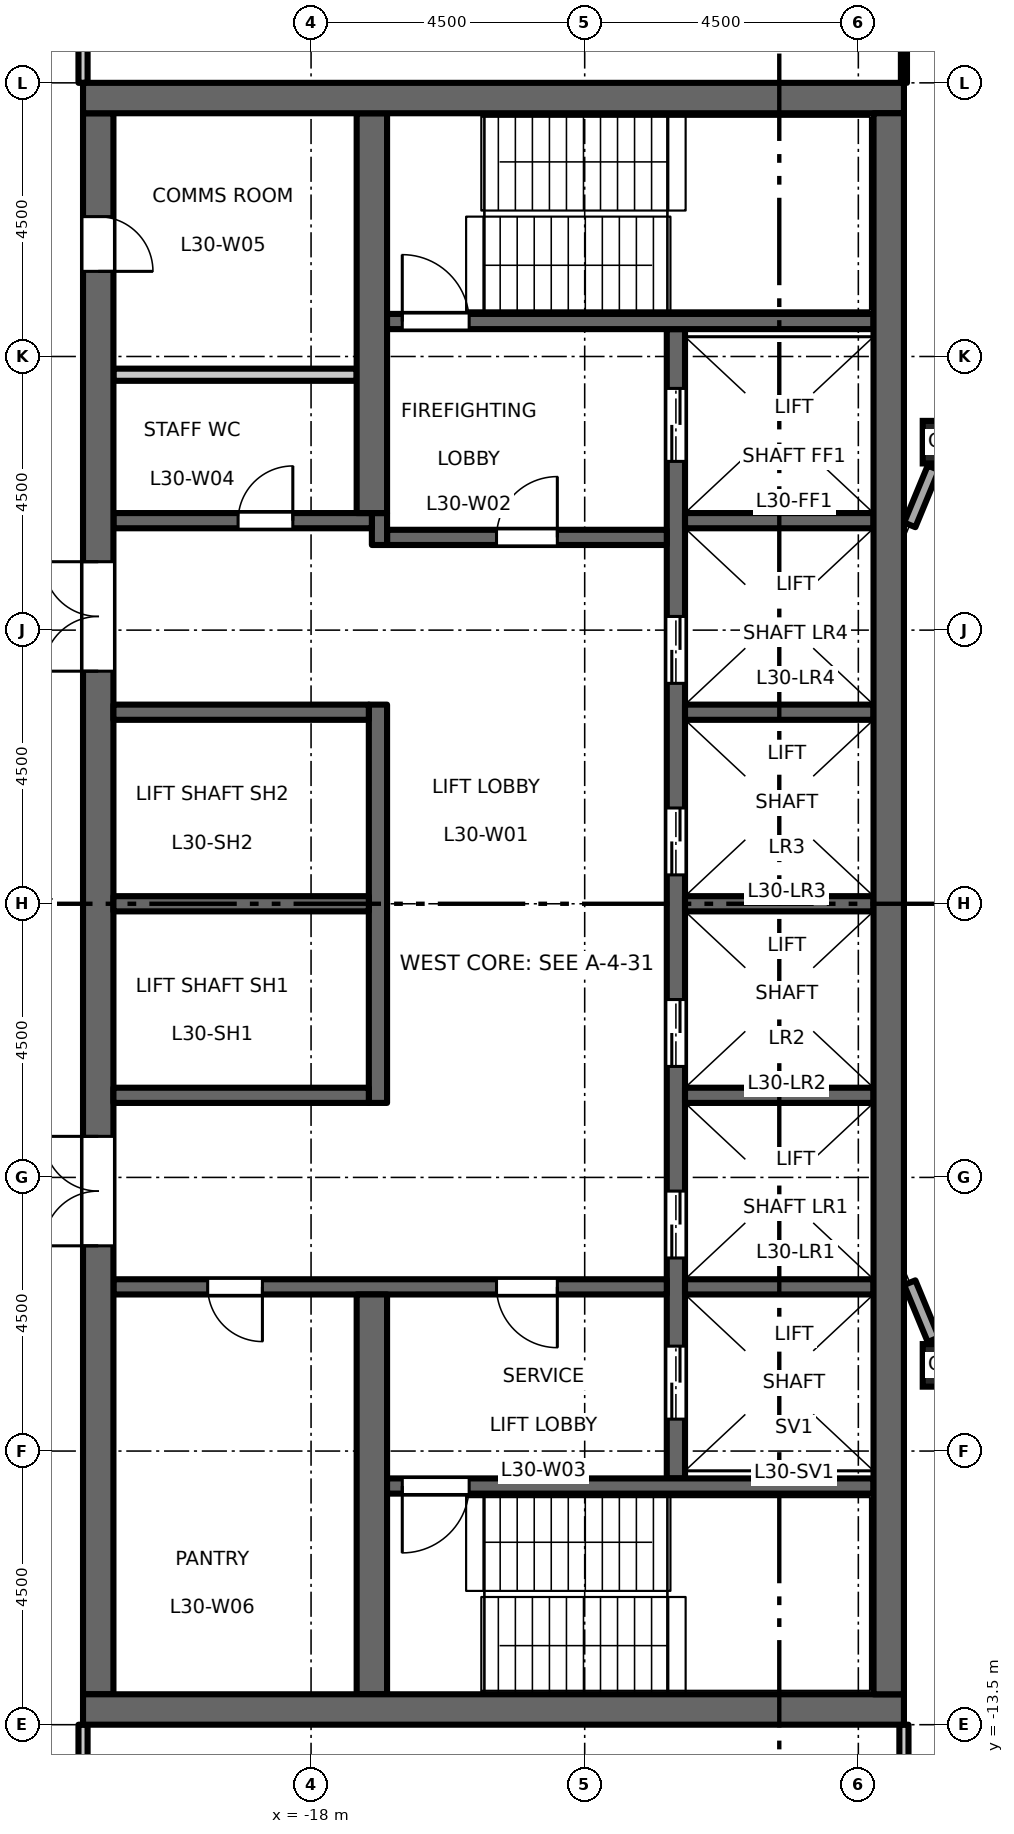
"""IFC4 building model, lengths in metres.
Left out: names, types, materials, properties, quantities, classifications, styles, units other than length and angle.
Written with IfcOpenShell. Run it as: python <this file> out.ifc"""

import sys

from ifc_helpers import new_model, si_unit, direction, frame, frame_2d, origin, origin_2d, place, context, subcontext, project, spatial, rectangle, hollow_rectangle, extrude, element, fill, save


model = new_model("IFC4")
c1 = context("Model", 3, precision=1e-05, world=origin(), true_north=direction((0.0, 1.0)))
c2 = subcontext(c1, "Body", "Model", "MODEL_VIEW")
j1 = project(units=[si_unit("LENGTHUNIT", "METRE"), si_unit("PLANEANGLEUNIT", "RADIAN")], contexts=[c1])
p1 = place(None, origin())
s1 = spatial("IfcSite", under=j1, at=p1, CompositionType="ELEMENT")
p2 = place(p1, origin())
s2 = spatial("IfcBuilding", under=s1, at=p2, CompositionType="ELEMENT")
p3 = place(p2, frame((0.0, 0.0, 140.7)))
s3 = spatial("IfcBuildingStorey", under=s2, at=p3, CompositionType="ELEMENT", Elevation=140.7)
for number, where, z_axis, x_axis in (
    (1, (-7.591, -7.591, 0.0), (0.0, 0.0, 1.0), (1.0, 0.0, 0.0)),
    (2, (-7.591, 7.591, 0.0), (0.0, 0.0, 1.0), (1.0, 0.0, 0.0)),
):
    element("IfcColumn", number, at=place(p3, frame(where, z_axis=z_axis, x_axis=x_axis)), inside=s3, PredefinedType="COLUMN", context=c2, shape_type="SweptSolid", body=[
        extrude(hollow_rectangle(XDim=0.7, YDim=0.7, WallThickness=0.04, at=origin_2d()), origin(), (0.0, 0.0, 1.0), 4.5),
    ])
p4 = place(p3, frame((-12.0, -9.45, 0.0), z_axis=(0.0, 0.0, 1.0), x_axis=(0.0, 1.0, 0.0)))
e3 = element("IfcWall", 3, at=p4, inside=s3, PredefinedType="SHEAR", context=c2, shape_type="SweptSolid", body=[
    extrude(rectangle(XDim=18.9, YDim=0.3, at=frame_2d((9.45, 0.0))), origin(), (0.0, 0.0, 1.0), 4.35),
])
p5 = place(p4, frame((3.625, 0.0, 0.0)))
e4 = element("IfcOpeningElement", 4, at=p5, cuts=e3, PredefinedType="OPENING", context=c2, shape_type="SweptSolid", body=[
    extrude(rectangle(XDim=1.1, YDim=2.1, at=frame_2d((0.55, 1.05))), frame((0.0, 0.16, 0.0), z_axis=(0.0, -1.0, 0.0), x_axis=(1.0, 0.0, 0.0)), (0.0, 0.0, 1.0), 0.32),
])
p6 = place(p4, frame((6.775, 0.0, 0.0)))
e5 = element("IfcOpeningElement", 5, at=p6, cuts=e3, PredefinedType="OPENING", context=c2, shape_type="SweptSolid", body=[
    extrude(rectangle(XDim=1.1, YDim=2.1, at=frame_2d((0.55, 1.05))), frame((0.0, 0.16, 0.0), z_axis=(0.0, -1.0, 0.0), x_axis=(1.0, 0.0, 0.0)), (0.0, 0.0, 1.0), 0.32),
])
p7 = place(p4, frame((9.925, 0.0, 0.0)))
e6 = element("IfcOpeningElement", 6, at=p7, cuts=e3, PredefinedType="OPENING", context=c2, shape_type="SweptSolid", body=[
    extrude(rectangle(XDim=1.1, YDim=2.1, at=frame_2d((0.55, 1.05))), frame((0.0, 0.16, 0.0), z_axis=(0.0, -1.0, 0.0), x_axis=(1.0, 0.0, 0.0)), (0.0, 0.0, 1.0), 0.32),
])
p8 = place(p4, frame((13.075, 0.0, 0.0)))
e7 = element("IfcOpeningElement", 7, at=p8, cuts=e3, PredefinedType="OPENING", context=c2, shape_type="SweptSolid", body=[
    extrude(rectangle(XDim=1.1, YDim=2.1, at=frame_2d((0.55, 1.05))), frame((0.0, 0.16, 0.0), z_axis=(0.0, -1.0, 0.0), x_axis=(1.0, 0.0, 0.0)), (0.0, 0.0, 1.0), 0.32),
])
p9 = place(p4, frame((16.725, 0.0, 0.0)))
e8 = element("IfcOpeningElement", 8, at=p9, cuts=e3, PredefinedType="OPENING", context=c2, shape_type="SweptSolid", body=[
    extrude(rectangle(XDim=1.2, YDim=2.1, at=frame_2d((0.6, 1.05))), frame((0.0, 0.16, 0.0), z_axis=(0.0, -1.0, 0.0), x_axis=(1.0, 0.0, 0.0)), (0.0, 0.0, 1.0), 0.32),
])
p10 = place(p4, frame((0.975, 0.0, 0.0)))
e9 = element("IfcOpeningElement", 9, at=p10, cuts=e3, PredefinedType="OPENING", context=c2, shape_type="SweptSolid", body=[
    extrude(rectangle(XDim=1.2, YDim=2.1, at=frame_2d((0.6, 1.05))), frame((0.0, 0.16, 0.0), z_axis=(0.0, -1.0, 0.0), x_axis=(1.0, 0.0, 0.0)), (0.0, 0.0, 1.0), 0.32),
])
p11 = place(p3, frame((-12.15, 6.025, 0.0), z_axis=(0.0, 0.0, 1.0), x_axis=(-1.0, 0.0, 0.0)))
e10 = element("IfcWall", 10, at=p11, inside=s3, PredefinedType="SHEAR", context=c2, shape_type="SweptSolid", body=[
    extrude(rectangle(XDim=4.6, YDim=0.25, at=frame_2d((2.3, 0.0))), origin(), (0.0, 0.0, 1.0), 4.35),
])
p12 = place(p11, frame((1.8, 0.0, 0.0)))
e11 = element("IfcOpeningElement", 11, at=p12, cuts=e10, PredefinedType="OPENING", context=c2, shape_type="SweptSolid", body=[
    extrude(rectangle(XDim=1.0, YDim=2.1, at=frame_2d((0.5, 1.05))), frame((0.0, 0.135, 0.0), z_axis=(0.0, -1.0, 0.0), x_axis=(1.0, 0.0, 0.0)), (0.0, 0.0, 1.0), 0.27),
])
p13 = place(p3, frame((-16.875, 5.9, 0.0), z_axis=(0.0, 0.0, 1.0), x_axis=(0.0, 1.0, 0.0)))
e12 = element("IfcWall", 12, at=p13, inside=s3, PredefinedType="SHEAR", context=c2, shape_type="SweptSolid", body=[
    extrude(rectangle(XDim=0.525, YDim=0.25, at=frame_2d((0.263, 0.0))), origin(), (0.0, 0.0, 1.0), 4.35),
])
p14 = place(p3, frame((-17.0, 6.3, 0.0), z_axis=(0.0, 0.0, 1.0), x_axis=(-1.0, 0.0, 0.0)))
e13 = element("IfcWall", 13, at=p14, inside=s3, PredefinedType="SHEAR", context=c2, shape_type="SweptSolid", body=[
    extrude(rectangle(XDim=4.25, YDim=0.25, at=frame_2d((2.125, 0.0))), origin(), (0.0, 0.0, 1.0), 4.35),
])
p15 = place(p14, frame((1.3, 0.0, 0.0)))
e14 = element("IfcOpeningElement", 14, at=p15, cuts=e13, PredefinedType="OPENING", context=c2, shape_type="SweptSolid", body=[
    extrude(rectangle(XDim=0.9, YDim=2.1, at=frame_2d((0.45, 1.05))), frame((0.0, 0.135, 0.0), z_axis=(0.0, -1.0, 0.0), x_axis=(1.0, 0.0, 0.0)), (0.0, 0.0, 1.0), 0.27),
])
p16 = place(p3, frame((-12.15, -6.3, 0.0), z_axis=(0.0, 0.0, 1.0), x_axis=(-1.0, 0.0, 0.0)))
e15 = element("IfcWall", 15, at=p16, inside=s3, PredefinedType="SHEAR", context=c2, shape_type="SweptSolid", body=[
    extrude(rectangle(XDim=9.1, YDim=0.25, at=frame_2d((4.55, 0.0))), origin(), (0.0, 0.0, 1.0), 4.35),
])
p17 = place(p16, frame((1.8, 0.0, 0.0)))
e16 = element("IfcOpeningElement", 16, at=p17, cuts=e15, PredefinedType="OPENING", context=c2, shape_type="SweptSolid", body=[
    extrude(rectangle(XDim=1.0, YDim=2.1, at=frame_2d((0.5, 1.05))), frame((0.0, 0.135, 0.0), z_axis=(0.0, -1.0, 0.0), x_axis=(1.0, 0.0, 0.0)), (0.0, 0.0, 1.0), 0.27),
])
p18 = place(p16, frame((6.65, 0.0, 0.0)))
e17 = element("IfcOpeningElement", 17, at=p18, cuts=e15, PredefinedType="OPENING", context=c2, shape_type="SweptSolid", body=[
    extrude(rectangle(XDim=0.9, YDim=2.1, at=frame_2d((0.45, 1.05))), frame((0.0, 0.135, 0.0), z_axis=(0.0, -1.0, 0.0), x_axis=(1.0, 0.0, 0.0)), (0.0, 0.0, 1.0), 0.27),
])
p19 = place(p3, frame((-21.5, -13.0, 0.0), z_axis=(0.0, 0.0, 1.0), x_axis=(0.0, 1.0, 0.0)))
e18 = element("IfcWall", 18, at=p19, inside=s3, PredefinedType="SHEAR", context=c2, shape_type="SweptSolid", body=[
    extrude(rectangle(XDim=26.0, YDim=0.5, at=frame_2d((13.0, 0.0))), origin(), (0.0, 0.0, 1.0), 4.35),
])
p20 = place(p19, frame((16.825, 0.0, 0.0)))
e19 = element("IfcOpeningElement", 19, at=p20, cuts=e18, PredefinedType="OPENING", context=c2, shape_type="SweptSolid", body=[
    extrude(rectangle(XDim=1.8, YDim=2.1, at=frame_2d((0.9, 1.05))), frame((0.0, 0.26, 0.0), z_axis=(0.0, -1.0, 0.0), x_axis=(1.0, 0.0, 0.0)), (0.0, 0.0, 1.0), 0.52),
])
p21 = place(p19, frame((7.375, 0.0, 0.0)))
e20 = element("IfcOpeningElement", 20, at=p21, cuts=e18, PredefinedType="OPENING", context=c2, shape_type="SweptSolid", body=[
    extrude(rectangle(XDim=1.8, YDim=2.1, at=frame_2d((0.9, 1.05))), frame((0.0, 0.26, 0.0), z_axis=(0.0, -1.0, 0.0), x_axis=(1.0, 0.0, 0.0)), (0.0, 0.0, 1.0), 0.52),
])
p22 = place(p19, frame((23.4, 0.0, 0.0)))
e21 = element("IfcOpeningElement", 21, at=p22, cuts=e18, PredefinedType="OPENING", context=c2, shape_type="SweptSolid", body=[
    extrude(rectangle(XDim=0.9, YDim=2.1, at=frame_2d((0.45, 1.05))), frame((0.0, 0.26, 0.0), z_axis=(0.0, -1.0, 0.0), x_axis=(1.0, 0.0, 0.0)), (0.0, 0.0, 1.0), 0.52),
])
p23 = place(p3, frame((-17.25, 8.7, 0.0), z_axis=(0.0, 0.0, 1.0), x_axis=(-1.0, 0.0, 0.0)))
e22 = element("IfcWall", 22, at=p23, inside=s3, PredefinedType="PARTITIONING", context=c2, shape_type="SweptSolid", body=[
    extrude(rectangle(XDim=4.0, YDim=0.2, at=frame_2d((2.0, 0.0))), origin(), (0.0, 0.0, 1.0), 4.35),
])
p24 = place(p3, frame((-16.9, -3.275, 0.0), z_axis=(0.0, 0.0, 1.0), x_axis=(0.0, 1.0, 0.0)))
e23 = element("IfcWall", 23, at=p24, inside=s3, PredefinedType="SHEAR", context=c2, shape_type="SweptSolid", body=[
    extrude(rectangle(XDim=6.55, YDim=0.3, at=frame_2d((3.275, 0.0))), origin(), (0.0, 0.0, 1.0), 4.35),
])
for number, where, z_axis, x_axis in (
    (24, (-17.05, 0.0, 0.0), (0.0, 0.0, 1.0), (-1.0, 0.0, 0.0)),
    (25, (-17.05, 3.15, 0.0), (0.0, 0.0, 1.0), (-1.0, 0.0, 0.0)),
    (26, (-17.05, -3.15, 0.0), (0.0, 0.0, 1.0), (-1.0, 0.0, 0.0)),
):
    element("IfcWall", number, at=place(p3, frame(where, z_axis=z_axis, x_axis=x_axis)), inside=s3, PredefinedType="SHEAR", context=c2, shape_type="SweptSolid", body=[
        extrude(rectangle(XDim=4.2, YDim=0.25, at=frame_2d((2.1, 0.0))), origin(), (0.0, 0.0, 1.0), 4.35),
    ])
for number, where, z_axis, x_axis in (
    (27, (-17.0, 6.425, 0.0), (0.0, 0.0, 1.0), (0.0, 1.0, 0.0)),
    (28, (-17.0, -13.0, 0.0), (0.0, 0.0, 1.0), (0.0, 1.0, 0.0)),
):
    element("IfcWall", number, at=place(p3, frame(where, z_axis=z_axis, x_axis=x_axis)), inside=s3, PredefinedType="SHEAR", context=c2, shape_type="SweptSolid", body=[
        extrude(rectangle(XDim=6.575, YDim=0.5, at=frame_2d((3.288, 0.0))), origin(), (0.0, 0.0, 1.0), 4.35),
    ])
for number, where, z_axis, x_axis in (
    (29, (-8.75, 0.0, 0.0), (0.0, 0.0, 1.0), (-1.0, 0.0, 0.0)),
    (30, (-8.75, 3.15, 0.0), (0.0, 0.0, 1.0), (-1.0, 0.0, 0.0)),
    (31, (-8.75, 6.3, 0.0), (0.0, 0.0, 1.0), (-1.0, 0.0, 0.0)),
    (32, (-8.75, -3.15, 0.0), (0.0, 0.0, 1.0), (-1.0, 0.0, 0.0)),
    (33, (-8.75, -6.3, 0.0), (0.0, 0.0, 1.0), (-1.0, 0.0, 0.0)),
):
    element("IfcWall", number, at=place(p3, frame(where, z_axis=z_axis, x_axis=x_axis)), inside=s3, PredefinedType="SHEAR", context=c2, shape_type="SweptSolid", body=[
        extrude(rectangle(XDim=3.1, YDim=0.25, at=frame_2d((1.55, 0.0))), origin(), (0.0, 0.0, 1.0), 4.35),
    ])
p25 = place(p3, frame((-8.75, 9.575, 0.0), z_axis=(0.0, 0.0, 1.0), x_axis=(-1.0, 0.0, 0.0)))
e34 = element("IfcWall", 34, at=p25, inside=s3, PredefinedType="SHEAR", context=c2, shape_type="SweptSolid", body=[
    extrude(rectangle(XDim=8.0, YDim=0.25, at=frame_2d((4.0, 0.0))), origin(), (0.0, 0.0, 1.0), 4.35),
])
p26 = place(p25, frame((6.65, 0.0, 0.0)))
e35 = element("IfcOpeningElement", 35, at=p26, cuts=e34, PredefinedType="OPENING", context=c2, shape_type="SweptSolid", body=[
    extrude(rectangle(XDim=1.1, YDim=2.1, at=frame_2d((0.55, 1.05))), frame((0.0, 0.135, 0.0), z_axis=(0.0, -1.0, 0.0), x_axis=(1.0, 0.0, 0.0)), (0.0, 0.0, 1.0), 0.27),
])
p27 = place(p3, frame((-8.75, -9.575, 0.0), z_axis=(0.0, 0.0, 1.0), x_axis=(-1.0, 0.0, 0.0)))
e36 = element("IfcWall", 36, at=p27, inside=s3, PredefinedType="SHEAR", context=c2, shape_type="SweptSolid", body=[
    extrude(rectangle(XDim=8.0, YDim=0.25, at=frame_2d((4.0, 0.0))), origin(), (0.0, 0.0, 1.0), 4.35),
])
p28 = place(p27, frame((6.65, 0.0, 0.0)))
e37 = element("IfcOpeningElement", 37, at=p28, cuts=e36, PredefinedType="OPENING", context=c2, shape_type="SweptSolid", body=[
    extrude(rectangle(XDim=1.1, YDim=2.1, at=frame_2d((0.55, 1.05))), frame((0.0, 0.135, 0.0), z_axis=(0.0, -1.0, 0.0), x_axis=(1.0, 0.0, 0.0)), (0.0, 0.0, 1.0), 0.27),
])
for number, where, z_axis, x_axis in (
    (38, (-8.25, 13.25, 0.0), (0.0, 0.0, 1.0), (-1.0, 0.0, 0.0)),
    (39, (-8.25, -13.25, 0.0), (0.0, 0.0, 1.0), (-1.0, 0.0, 0.0)),
):
    element("IfcWall", number, at=place(p3, frame(where, z_axis=z_axis, x_axis=x_axis)), inside=s3, PredefinedType="SHEAR", context=c2, shape_type="SweptSolid", body=[
        extrude(rectangle(XDim=13.5, YDim=0.5, at=frame_2d((6.75, 0.0))), origin(), (0.0, 0.0, 1.0), 4.35),
    ])
p29 = place(p3, frame((-8.5, -13.0, 0.0), z_axis=(0.0, 0.0, 1.0), x_axis=(0.0, 1.0, 0.0)))
e40 = element("IfcWall", 40, at=p29, inside=s3, PredefinedType="SHEAR", context=c2, shape_type="SweptSolid", body=[
    extrude(rectangle(XDim=26.0, YDim=0.5, at=frame_2d((13.0, 0.0))), origin(), (0.0, 0.0, 1.0), 4.35),
])
for number, where, z_axis, x_axis in (
    (41, (-7.766, 7.168, 0.0), (0.0, 0.0, 1.0), (-0.383, -0.924, 0.0)),
    (42, (-8.154, -6.231, 0.0), (0.0, 0.0, 1.0), (0.383, -0.924, 0.0)),
):
    element("IfcWall", number, at=place(p3, frame(where, z_axis=z_axis, x_axis=x_axis)), inside=s3, PredefinedType="STANDARD", context=c2, shape_type="SweptSolid", body=[
        extrude(rectangle(XDim=1.015, YDim=0.2, at=frame_2d((0.507, 0.0))), origin(), (0.0, 0.0, 1.0), 3.826),
    ])
for number, where, z_axis, x_axis in (
    (43, (-21.75, -18.925, 0.0), (0.0, 0.0, 1.0), (0.0, 1.0, 0.0)),
    (44, (-21.75, 13.5, 0.0), (0.0, 0.0, 1.0), (0.0, 1.0, 0.0)),
):
    element("IfcWall", number, at=place(p3, frame(where, z_axis=z_axis, x_axis=x_axis)), inside=s3, PredefinedType="PARTITIONING", context=c2, shape_type="SweptSolid", body=[
        extrude(rectangle(XDim=5.425, YDim=0.15, at=frame_2d((2.712, 0.0))), origin(), (0.0, 0.0, 1.0), 4.35),
    ])
p30 = place(p3, frame((-8.25, 13.5, 0.0), z_axis=(0.0, 0.0, 1.0), x_axis=(0.0, 1.0, 0.0)))
e45 = element("IfcWall", 45, at=p30, inside=s3, PredefinedType="PARTITIONING", context=c2, shape_type="SweptSolid", body=[
    extrude(rectangle(XDim=5.425, YDim=0.1, at=frame_2d((2.712, 0.0))), origin(), (0.0, 0.0, 1.0), 4.35),
])
p31 = place(p3, frame((-8.25, -18.925, 0.0), z_axis=(0.0, 0.0, 1.0), x_axis=(0.0, 1.0, 0.0)))
e46 = element("IfcWall", 46, at=p31, inside=s3, PredefinedType="PARTITIONING", context=c2, shape_type="SweptSolid", body=[
    extrude(rectangle(XDim=5.425, YDim=0.15, at=frame_2d((2.712, 0.0))), origin(), (0.0, 0.0, 1.0), 4.35),
])
p32 = place(p12, origin())
e47 = element("IfcDoor", 47, at=p32, inside=s3, OperationType="SINGLE_SWING_LEFT", PredefinedType="DOOR", context=c2, shape_type="SweptSolid", body=[
    extrude(rectangle(XDim=1.0, YDim=2.1, at=frame_2d((0.5, 1.05))), frame((0.0, 0.025, 0.0), z_axis=(0.0, -1.0, 0.0), x_axis=(1.0, 0.0, 0.0)), (0.0, 0.0, 1.0), 0.05),
])
fill(e11, e47)
p33 = place(p17, origin())
e48 = element("IfcDoor", 48, at=p33, inside=s3, OperationType="SINGLE_SWING_RIGHT", PredefinedType="DOOR", context=c2, shape_type="SweptSolid", body=[
    extrude(rectangle(XDim=1.0, YDim=2.1, at=frame_2d((0.5, 1.05))), frame((0.0, 0.025, 0.0), z_axis=(0.0, -1.0, 0.0), x_axis=(1.0, 0.0, 0.0)), (0.0, 0.0, 1.0), 0.05),
])
fill(e16, e48)
p34 = place(p26, origin())
e49 = element("IfcDoor", 49, at=p34, inside=s3, OperationType="SINGLE_SWING_RIGHT", PredefinedType="DOOR", context=c2, shape_type="SweptSolid", body=[
    extrude(rectangle(XDim=1.1, YDim=2.1, at=frame_2d((0.55, 1.05))), frame((0.0, 0.025, 0.0), z_axis=(0.0, -1.0, 0.0), x_axis=(1.0, 0.0, 0.0)), (0.0, 0.0, 1.0), 0.05),
])
fill(e35, e49)
p35 = place(p28, origin())
e50 = element("IfcDoor", 50, at=p35, inside=s3, OperationType="SINGLE_SWING_LEFT", PredefinedType="DOOR", context=c2, shape_type="SweptSolid", body=[
    extrude(rectangle(XDim=1.1, YDim=2.1, at=frame_2d((0.55, 1.05))), frame((0.0, 0.025, 0.0), z_axis=(0.0, -1.0, 0.0), x_axis=(1.0, 0.0, 0.0)), (0.0, 0.0, 1.0), 0.05),
])
fill(e37, e50)
p36 = place(p20, origin())
e51 = element("IfcDoor", 51, at=p36, inside=s3, OperationType="DOUBLE_DOOR_DOUBLE_SWING", PredefinedType="DOOR", context=c2, shape_type="SweptSolid", body=[
    extrude(rectangle(XDim=1.8, YDim=2.1, at=frame_2d((0.9, 1.05))), frame((0.0, 0.025, 0.0), z_axis=(0.0, -1.0, 0.0), x_axis=(1.0, 0.0, 0.0)), (0.0, 0.0, 1.0), 0.05),
])
fill(e19, e51)
p37 = place(p21, origin())
e52 = element("IfcDoor", 52, at=p37, inside=s3, OperationType="DOUBLE_DOOR_DOUBLE_SWING", PredefinedType="DOOR", context=c2, shape_type="SweptSolid", body=[
    extrude(rectangle(XDim=1.8, YDim=2.1, at=frame_2d((0.9, 1.05))), frame((0.0, 0.025, 0.0), z_axis=(0.0, -1.0, 0.0), x_axis=(1.0, 0.0, 0.0)), (0.0, 0.0, 1.0), 0.05),
])
fill(e20, e52)
p38 = place(p5, origin())
e53 = element("IfcDoor", 53, at=p38, inside=s3, OperationType="DOUBLE_DOOR_SLIDING", PredefinedType="DOOR", context=c2, shape_type="SweptSolid", body=[
    extrude(rectangle(XDim=1.1, YDim=2.1, at=frame_2d((0.55, 1.05))), frame((0.0, 0.025, 0.0), z_axis=(0.0, -1.0, 0.0), x_axis=(1.0, 0.0, 0.0)), (0.0, 0.0, 1.0), 0.05),
])
fill(e4, e53)
p39 = place(p6, origin())
e54 = element("IfcDoor", 54, at=p39, inside=s3, OperationType="DOUBLE_DOOR_SLIDING", PredefinedType="DOOR", context=c2, shape_type="SweptSolid", body=[
    extrude(rectangle(XDim=1.1, YDim=2.1, at=frame_2d((0.55, 1.05))), frame((0.0, 0.025, 0.0), z_axis=(0.0, -1.0, 0.0), x_axis=(1.0, 0.0, 0.0)), (0.0, 0.0, 1.0), 0.05),
])
fill(e5, e54)
p40 = place(p7, origin())
e55 = element("IfcDoor", 55, at=p40, inside=s3, OperationType="DOUBLE_DOOR_SLIDING", PredefinedType="DOOR", context=c2, shape_type="SweptSolid", body=[
    extrude(rectangle(XDim=1.1, YDim=2.1, at=frame_2d((0.55, 1.05))), frame((0.0, 0.025, 0.0), z_axis=(0.0, -1.0, 0.0), x_axis=(1.0, 0.0, 0.0)), (0.0, 0.0, 1.0), 0.05),
])
fill(e6, e55)
p41 = place(p8, origin())
e56 = element("IfcDoor", 56, at=p41, inside=s3, OperationType="DOUBLE_DOOR_SLIDING", PredefinedType="DOOR", context=c2, shape_type="SweptSolid", body=[
    extrude(rectangle(XDim=1.1, YDim=2.1, at=frame_2d((0.55, 1.05))), frame((0.0, 0.025, 0.0), z_axis=(0.0, -1.0, 0.0), x_axis=(1.0, 0.0, 0.0)), (0.0, 0.0, 1.0), 0.05),
])
fill(e7, e56)
p42 = place(p9, origin())
e57 = element("IfcDoor", 57, at=p42, inside=s3, OperationType="DOUBLE_DOOR_SLIDING", PredefinedType="DOOR", context=c2, shape_type="SweptSolid", body=[
    extrude(rectangle(XDim=1.2, YDim=2.1, at=frame_2d((0.6, 1.05))), frame((0.0, 0.025, 0.0), z_axis=(0.0, -1.0, 0.0), x_axis=(1.0, 0.0, 0.0)), (0.0, 0.0, 1.0), 0.05),
])
fill(e8, e57)
p43 = place(p10, origin())
e58 = element("IfcDoor", 58, at=p43, inside=s3, OperationType="DOUBLE_DOOR_SLIDING", PredefinedType="DOOR", context=c2, shape_type="SweptSolid", body=[
    extrude(rectangle(XDim=1.2, YDim=2.1, at=frame_2d((0.6, 1.05))), frame((0.0, 0.025, 0.0), z_axis=(0.0, -1.0, 0.0), x_axis=(1.0, 0.0, 0.0)), (0.0, 0.0, 1.0), 0.05),
])
fill(e9, e58)
p44 = place(p15, origin())
e59 = element("IfcDoor", 59, at=p44, inside=s3, OperationType="SINGLE_SWING_LEFT", PredefinedType="DOOR", context=c2, shape_type="SweptSolid", body=[
    extrude(rectangle(XDim=0.9, YDim=2.1, at=frame_2d((0.45, 1.05))), frame((0.0, 0.025, 0.0), z_axis=(0.0, -1.0, 0.0), x_axis=(1.0, 0.0, 0.0)), (0.0, 0.0, 1.0), 0.05),
])
fill(e14, e59)
p45 = place(p22, origin())
e60 = element("IfcDoor", 60, at=p45, inside=s3, OperationType="SINGLE_SWING_LEFT", PredefinedType="DOOR", context=c2, shape_type="SweptSolid", body=[
    extrude(rectangle(XDim=0.9, YDim=2.1, at=frame_2d((0.45, 1.05))), frame((0.0, 0.025, 0.0), z_axis=(0.0, -1.0, 0.0), x_axis=(1.0, 0.0, 0.0)), (0.0, 0.0, 1.0), 0.05),
])
fill(e21, e60)
p46 = place(p18, origin())
e61 = element("IfcDoor", 61, at=p46, inside=s3, OperationType="SINGLE_SWING_RIGHT", PredefinedType="DOOR", context=c2, shape_type="SweptSolid", body=[
    extrude(rectangle(XDim=0.9, YDim=2.1, at=frame_2d((0.45, 1.05))), frame((0.0, 0.025, 0.0), z_axis=(0.0, -1.0, 0.0), x_axis=(1.0, 0.0, 0.0)), (0.0, 0.0, 1.0), 0.05),
])
fill(e17, e61)
save(model, sys.argv[1])
